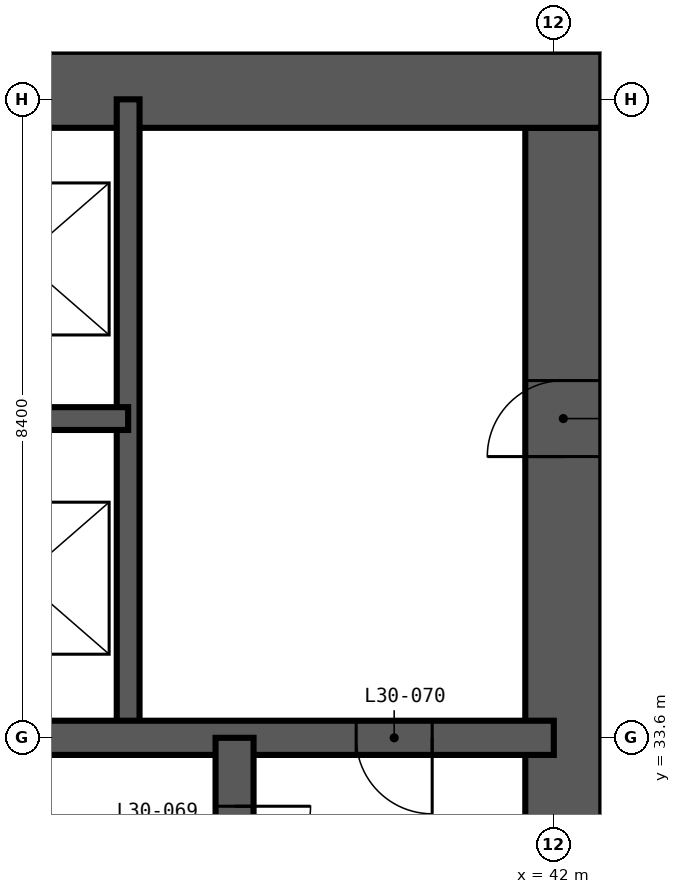
"""IFC4 building model, lengths in metres.
Left out: names, types, materials, properties, quantities, classifications, styles, units other than length and angle.
Written with IfcOpenShell. Run it as: python <this file> out.ifc"""

import sys

from ifc_helpers import new_model, si_unit, direction, frame, frame_2d, origin, place, context, subcontext, project, spatial, rectangle, extrude, element, fill, save


model = new_model("IFC4")
c1 = context("Model", 3, precision=1e-05, world=origin(), true_north=direction((0.0, 1.0)))
c2 = subcontext(c1, "Body", "Model", "MODEL_VIEW")
j1 = project(units=[si_unit("LENGTHUNIT", "METRE"), si_unit("PLANEANGLEUNIT", "RADIAN")], contexts=[c1])
p1 = place(None, origin())
s1 = spatial("IfcSite", under=j1, at=p1, CompositionType="ELEMENT")
p2 = place(p1, origin())
s2 = spatial("IfcBuilding", under=s1, at=p2, CompositionType="ELEMENT")
p3 = place(p2, frame((0.0, 0.0, 118.8)))
s3 = spatial("IfcBuildingStorey", under=s2, at=p3, CompositionType="ELEMENT", Elevation=118.8)
p4 = place(p3, frame((42.125, 17.175, -0.35), z_axis=(0.0, 0.0, 1.0), x_axis=(0.0, 1.0, 0.0)))
e1 = element("IfcWall", 1, at=p4, inside=s3, PredefinedType="SHEAR", context=c2, shape_type="SweptSolid", body=[
    extrude(rectangle(XDim=24.45, YDim=1.0, at=frame_2d((12.225, 0.0))), origin(), (0.0, 0.0, 1.0), 3.6),
])
p5 = place(p4, frame((0.425, 0.0, 0.35)))
e2 = element("IfcOpeningElement", 2, at=p5, cuts=e1, PredefinedType="OPENING", context=c2, shape_type="SweptSolid", body=[
    extrude(rectangle(XDim=1.2, YDim=2.2, at=frame_2d((0.6, 1.1))), frame((0.0, 0.51, 0.0), z_axis=(0.0, -1.0, 0.0), x_axis=(1.0, 0.0, 0.0)), (0.0, 0.0, 1.0), 1.02),
])
p6 = place(p4, frame((11.325, 0.0, 0.35)))
e3 = element("IfcOpeningElement", 3, at=p6, cuts=e1, PredefinedType="OPENING", context=c2, shape_type="SweptSolid", body=[
    extrude(rectangle(XDim=1.8, YDim=2.2, at=frame_2d((0.9, 1.1))), frame((0.0, 0.51, 0.0), z_axis=(0.0, -1.0, 0.0), x_axis=(1.0, 0.0, 0.0)), (0.0, 0.0, 1.0), 1.02),
])
p7 = place(p4, frame((20.125, 0.0, 0.35)))
e4 = element("IfcOpeningElement", 4, at=p7, cuts=e1, PredefinedType="OPENING", context=c2, shape_type="SweptSolid", body=[
    extrude(rectangle(XDim=1.0, YDim=2.1, at=frame_2d((0.5, 1.05))), frame((0.0, 0.51, 0.0), z_axis=(0.0, -1.0, 0.0), x_axis=(1.0, 0.0, 0.0)), (0.0, 0.0, 1.0), 1.02),
])
p8 = place(p3, frame((42.625, 42.125, -0.35), z_axis=(0.0, 0.0, 1.0), x_axis=(-1.0, 0.0, 0.0)))
e5 = element("IfcWall", 5, at=p8, inside=s3, PredefinedType="SHEAR", context=c2, shape_type="SweptSolid", body=[
    extrude(rectangle(XDim=26.45, YDim=1.0, at=frame_2d((13.225, 0.0))), origin(), (0.0, 0.0, 1.0), 3.6),
])
p9 = place(p8, frame((21.125, 0.0, 0.35)))
e6 = element("IfcOpeningElement", 6, at=p9, cuts=e5, PredefinedType="OPENING", context=c2, shape_type="SweptSolid", body=[
    extrude(rectangle(XDim=1.0, YDim=2.1, at=frame_2d((0.5, 1.05))), frame((0.0, 0.51, 0.0), z_axis=(0.0, -1.0, 0.0), x_axis=(1.0, 0.0, 0.0)), (0.0, 0.0, 1.0), 1.02),
])
p10 = place(p8, frame((10.525, 0.0, 0.35)))
e7 = element("IfcOpeningElement", 7, at=p10, cuts=e5, PredefinedType="OPENING", context=c2, shape_type="SweptSolid", body=[
    extrude(rectangle(XDim=1.2, YDim=2.2, at=frame_2d((0.6, 1.1))), frame((0.0, 0.51, 0.0), z_axis=(0.0, -1.0, 0.0), x_axis=(1.0, 0.0, 0.0)), (0.0, 0.0, 1.0), 1.02),
])
p11 = place(p3, frame((36.4, 33.6, -0.35), z_axis=(0.0, 0.0, 1.0), x_axis=(0.0, 1.0, 0.0)))
e8 = element("IfcWall", 8, at=p11, inside=s3, PredefinedType="SHEAR", context=c2, shape_type="SweptSolid", body=[
    extrude(rectangle(XDim=8.4, YDim=0.3, at=frame_2d((4.2, 0.0))), origin(), (0.0, 0.0, 1.0), 3.6),
])
p12 = place(p3, frame((33.6, 37.8, -0.35), z_axis=(0.0, 0.0, 1.0), x_axis=(1.0, 0.0, 0.0)))
e9 = element("IfcWall", 9, at=p12, inside=s3, PredefinedType="SHEAR", context=c2, shape_type="SweptSolid", body=[
    extrude(rectangle(XDim=2.8, YDim=0.3, at=frame_2d((1.4, 0.0))), origin(), (0.0, 0.0, 1.0), 3.6),
])
p13 = place(p3, frame((16.8, 33.6, -0.35), z_axis=(0.0, 0.0, 1.0), x_axis=(1.0, 0.0, 0.0)))
e10 = element("IfcWall", 10, at=p13, inside=s3, PredefinedType="SHEAR", context=c2, shape_type="SweptSolid", body=[
    extrude(rectangle(XDim=25.2, YDim=0.45, at=frame_2d((12.6, 0.0))), origin(), (0.0, 0.0, 1.0), 3.6),
])
p14 = place(p13, frame((22.6, 0.0, 0.35)))
e11 = element("IfcOpeningElement", 11, at=p14, cuts=e10, PredefinedType="OPENING", context=c2, shape_type="SweptSolid", body=[
    extrude(rectangle(XDim=1.0, YDim=2.1, at=frame_2d((0.5, 1.05))), frame((0.0, 0.235, 0.0), z_axis=(0.0, -1.0, 0.0), x_axis=(1.0, 0.0, 0.0)), (0.0, 0.0, 1.0), 0.47),
])
p15 = place(p3, frame((37.8, 30.8, -0.35), z_axis=(0.0, 0.0, 1.0), x_axis=(0.0, 1.0, 0.0)))
e12 = element("IfcWall", 12, at=p15, inside=s3, PredefinedType="SHEAR", context=c2, shape_type="SweptSolid", body=[
    extrude(rectangle(XDim=2.8, YDim=0.5, at=frame_2d((1.4, 0.0))), origin(), (0.0, 0.0, 1.0), 3.6),
])
p16 = place(p15, frame((0.9, 0.0, 0.35)))
e13 = element("IfcOpeningElement", 13, at=p16, cuts=e12, PredefinedType="OPENING", context=c2, shape_type="SweptSolid", body=[
    extrude(rectangle(XDim=1.0, YDim=2.1, at=frame_2d((0.5, 1.05))), frame((0.0, 0.26, 0.0), z_axis=(0.0, -1.0, 0.0), x_axis=(1.0, 0.0, 0.0)), (0.0, 0.0, 1.0), 0.52),
])
p17 = place(p16, frame((1.0, 0.0, 0.0), z_axis=(0.0, 0.0, 1.0), x_axis=(-1.0, 0.0, 0.0)))
e14 = element("IfcDoor", 14, at=p17, inside=s3, OperationType="SINGLE_SWING_LEFT", PredefinedType="DOOR", context=c2, shape_type="SweptSolid", body=[
    extrude(rectangle(XDim=1.0, YDim=2.1, at=frame_2d((0.5, 1.05))), frame((0.0, 0.025, 0.0), z_axis=(0.0, -1.0, 0.0), x_axis=(1.0, 0.0, 0.0)), (0.0, 0.0, 1.0), 0.05),
])
fill(e13, e14)
p18 = place(p14, frame((1.0, 0.0, 0.0), z_axis=(0.0, 0.0, 1.0), x_axis=(-1.0, 0.0, 0.0)))
e15 = element("IfcDoor", 15, at=p18, inside=s3, OperationType="SINGLE_SWING_LEFT", PredefinedType="DOOR", context=c2, shape_type="SweptSolid", body=[
    extrude(rectangle(XDim=1.0, YDim=2.1, at=frame_2d((0.5, 1.05))), frame((0.0, 0.025, 0.0), z_axis=(0.0, -1.0, 0.0), x_axis=(1.0, 0.0, 0.0)), (0.0, 0.0, 1.0), 0.05),
])
fill(e11, e15)
p19 = place(p7, origin())
e16 = element("IfcDoor", 16, at=p19, inside=s3, OperationType="SINGLE_SWING_LEFT", PredefinedType="DOOR", context=c2, shape_type="SweptSolid", body=[
    extrude(rectangle(XDim=1.0, YDim=2.1, at=frame_2d((0.5, 1.05))), frame((0.0, 0.025, 0.0), z_axis=(0.0, -1.0, 0.0), x_axis=(1.0, 0.0, 0.0)), (0.0, 0.0, 1.0), 0.05),
])
fill(e4, e16)
save(model, sys.argv[1])
